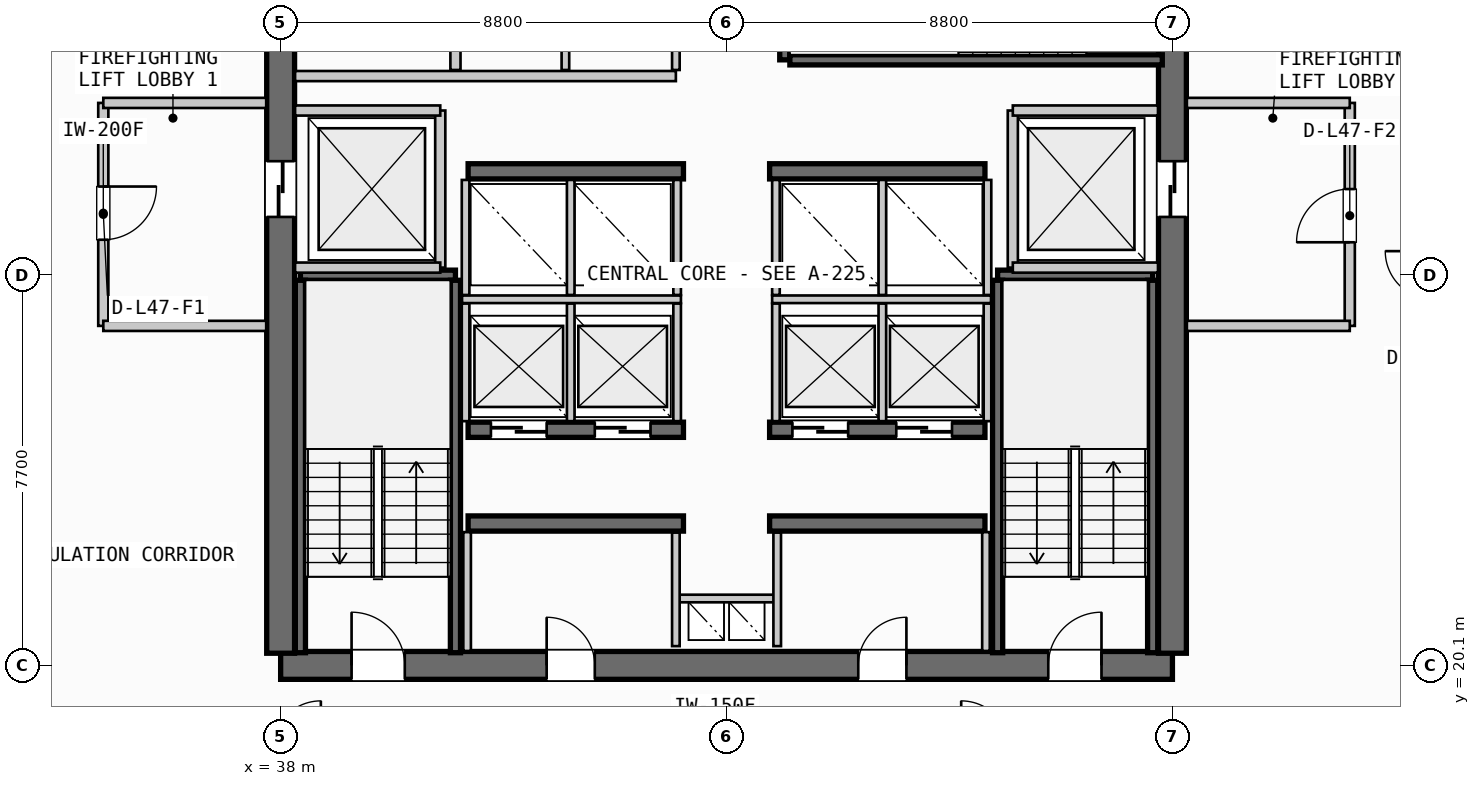
"""IFC4 building model, lengths in metres.
Left out: names, types, materials, properties, quantities, classifications, styles, units other than length and angle.
Written with IfcOpenShell. Run it as: python <this file> out.ifc"""

import sys

from ifc_helpers import new_model, si_unit, direction, frame, frame_2d, origin, place, context, subcontext, project, spatial, rectangle, extrude, source, transform, mapped, element, fill, save


model = new_model("IFC4")
c1 = context("Model", 3, precision=1e-05, world=origin(), true_north=direction((0.0, 1.0)))
c2 = subcontext(c1, "Body", "Model", "MODEL_VIEW")
j1 = project(units=[si_unit("LENGTHUNIT", "METRE"), si_unit("PLANEANGLEUNIT", "RADIAN")], contexts=[c1])
p1 = place(None, origin())
s1 = spatial("IfcSite", under=j1, at=p1, CompositionType="ELEMENT")
p2 = place(p1, origin())
s2 = spatial("IfcBuilding", under=s1, at=p2, CompositionType="ELEMENT")
p3 = place(p2, frame((0.0, 0.0, 183.4)))
s3 = spatial("IfcBuildingStorey", under=s2, at=p3, CompositionType="ELEMENT", Elevation=183.4)
p4 = place(p3, frame((38.0, 20.1, 0.0), z_axis=(0.0, 0.0, 1.0), x_axis=(1.0, 0.0, 0.0)))
e1 = element("IfcWall", 1, at=p4, inside=s3, PredefinedType="SHEAR", context=c2, shape_type="SweptSolid", body=[
    extrude(rectangle(XDim=17.6, YDim=0.55, at=frame_2d((8.8, 0.0))), origin(), (0.0, 0.0, 1.0), 3.26),
])
p5 = place(p4, frame((1.4, 0.0, 0.0)))
e2 = element("IfcOpeningElement", 2, at=p5, cuts=e1, PredefinedType="OPENING", context=c2, shape_type="SweptSolid", body=[
    extrude(rectangle(XDim=1.05, YDim=2.15, at=frame_2d((0.525, 1.075))), frame((0.0, 0.285, 0.0), z_axis=(0.0, -1.0, 0.0), x_axis=(1.0, 0.0, 0.0)), (0.0, 0.0, 1.0), 0.57),
])
p6 = place(p4, frame((15.15, 0.0, 0.0)))
e3 = element("IfcOpeningElement", 3, at=p6, cuts=e1, PredefinedType="OPENING", context=c2, shape_type="SweptSolid", body=[
    extrude(rectangle(XDim=1.05, YDim=2.15, at=frame_2d((0.525, 1.075))), frame((0.0, 0.285, 0.0), z_axis=(0.0, -1.0, 0.0), x_axis=(1.0, 0.0, 0.0)), (0.0, 0.0, 1.0), 0.57),
])
p7 = place(p4, frame((5.25, 0.0, 0.0)))
e4 = element("IfcOpeningElement", 4, at=p7, cuts=e1, PredefinedType="OPENING", context=c2, shape_type="SweptSolid", body=[
    extrude(rectangle(XDim=0.95, YDim=2.15, at=frame_2d((0.475, 1.075))), frame((0.0, 0.285, 0.0), z_axis=(0.0, -1.0, 0.0), x_axis=(1.0, 0.0, 0.0)), (0.0, 0.0, 1.0), 0.57),
])
p8 = place(p4, frame((11.4, 0.0, 0.0)))
e5 = element("IfcOpeningElement", 5, at=p8, cuts=e1, PredefinedType="OPENING", context=c2, shape_type="SweptSolid", body=[
    extrude(rectangle(XDim=0.95, YDim=2.15, at=frame_2d((0.475, 1.075))), frame((0.0, 0.285, 0.0), z_axis=(0.0, -1.0, 0.0), x_axis=(1.0, 0.0, 0.0)), (0.0, 0.0, 1.0), 0.57),
])
p9 = place(p3, frame((38.0, 35.26, 0.0), z_axis=(0.0, 0.0, 1.0), x_axis=(0.0, -1.0, 0.0)))
e6 = element("IfcWall", 6, at=p9, inside=s3, PredefinedType="SHEAR", context=c2, shape_type="SweptSolid", body=[
    extrude(rectangle(XDim=14.92, YDim=0.55, at=frame_2d((7.46, 0.0))), origin(), (0.0, 0.0, 1.0), 3.26),
])
p10 = place(p9, frame((5.21, 0.0, 0.0)))
e7 = element("IfcOpeningElement", 7, at=p10, cuts=e6, PredefinedType="OPENING", context=c2, shape_type="SweptSolid", body=[
    extrude(rectangle(XDim=1.1, YDim=2.2, at=frame_2d((0.55, 1.1))), frame((0.0, 0.285, 0.0), z_axis=(0.0, -1.0, 0.0), x_axis=(1.0, 0.0, 0.0)), (0.0, 0.0, 1.0), 0.57),
])
p11 = place(p3, frame((55.6, 20.34, 0.0), z_axis=(0.0, 0.0, 1.0), x_axis=(0.0, 1.0, 0.0)))
e8 = element("IfcWall", 8, at=p11, inside=s3, PredefinedType="SHEAR", context=c2, shape_type="SweptSolid", body=[
    extrude(rectangle(XDim=14.92, YDim=0.55, at=frame_2d((7.46, 0.0))), origin(), (0.0, 0.0, 1.0), 3.26),
])
p12 = place(p11, frame((12.71, 0.0, 0.0)))
e9 = element("IfcOpeningElement", 9, at=p12, cuts=e8, PredefinedType="OPENING", context=c2, shape_type="SweptSolid", body=[
    extrude(rectangle(XDim=1.05, YDim=2.15, at=frame_2d((0.525, 1.075))), frame((0.0, 0.285, 0.0), z_axis=(0.0, -1.0, 0.0), x_axis=(1.0, 0.0, 0.0)), (0.0, 0.0, 1.0), 0.57),
])
p13 = place(p11, frame((8.61, 0.0, 0.0)))
e10 = element("IfcOpeningElement", 10, at=p13, cuts=e8, PredefinedType="OPENING", context=c2, shape_type="SweptSolid", body=[
    extrude(rectangle(XDim=1.1, YDim=2.2, at=frame_2d((0.55, 1.1))), frame((0.0, 0.285, 0.0), z_axis=(0.0, -1.0, 0.0), x_axis=(1.0, 0.0, 0.0)), (0.0, 0.0, 1.0), 0.57),
])
for number, where, z_axis, x_axis in (
    (11, (41.7, 22.9, 0.0), (0.0, 0.0, 1.0), (1.0, 0.0, 0.0)),
    (12, (47.65, 22.9, 0.0), (0.0, 0.0, 1.0), (1.0, 0.0, 0.0)),
):
    element("IfcWall", number, at=place(p3, frame(where, z_axis=z_axis, x_axis=x_axis)), inside=s3, PredefinedType="SHEAR", context=c2, shape_type="SweptSolid", body=[
        extrude(rectangle(XDim=4.25, YDim=0.3, at=frame_2d((2.125, 0.0))), origin(), (0.0, 0.0, 1.0), 3.26),
    ])
p14 = place(p3, frame((41.7, 24.75, 0.0), z_axis=(0.0, 0.0, 1.0), x_axis=(1.0, 0.0, 0.0)))
e13 = element("IfcWall", 13, at=p14, inside=s3, PredefinedType="SHEAR", context=c2, shape_type="SweptSolid", body=[
    extrude(rectangle(XDim=4.25, YDim=0.3, at=frame_2d((2.125, 0.0))), origin(), (0.0, 0.0, 1.0), 3.26),
])
p15 = place(p14, frame((0.45, 0.0, 0.0)))
e14 = element("IfcOpeningElement", 14, at=p15, cuts=e13, PredefinedType="OPENING", context=c2, shape_type="SweptSolid", body=[
    extrude(rectangle(XDim=1.1, YDim=2.2, at=frame_2d((0.55, 1.1))), frame((0.0, 0.16, 0.0), z_axis=(0.0, -1.0, 0.0), x_axis=(1.0, 0.0, 0.0)), (0.0, 0.0, 1.0), 0.32),
])
p16 = place(p14, frame((2.5, 0.0, 0.0)))
e15 = element("IfcOpeningElement", 15, at=p16, cuts=e13, PredefinedType="OPENING", context=c2, shape_type="SweptSolid", body=[
    extrude(rectangle(XDim=1.1, YDim=2.2, at=frame_2d((0.55, 1.1))), frame((0.0, 0.16, 0.0), z_axis=(0.0, -1.0, 0.0), x_axis=(1.0, 0.0, 0.0)), (0.0, 0.0, 1.0), 0.32),
])
p17 = place(p3, frame((47.65, 24.75, 0.0), z_axis=(0.0, 0.0, 1.0), x_axis=(1.0, 0.0, 0.0)))
e16 = element("IfcWall", 16, at=p17, inside=s3, PredefinedType="SHEAR", context=c2, shape_type="SweptSolid", body=[
    extrude(rectangle(XDim=4.25, YDim=0.3, at=frame_2d((2.125, 0.0))), origin(), (0.0, 0.0, 1.0), 3.26),
])
p18 = place(p17, frame((0.45, 0.0, 0.0)))
e17 = element("IfcOpeningElement", 17, at=p18, cuts=e16, PredefinedType="OPENING", context=c2, shape_type="SweptSolid", body=[
    extrude(rectangle(XDim=1.1, YDim=2.2, at=frame_2d((0.55, 1.1))), frame((0.0, 0.16, 0.0), z_axis=(0.0, -1.0, 0.0), x_axis=(1.0, 0.0, 0.0)), (0.0, 0.0, 1.0), 0.32),
])
p19 = place(p17, frame((2.5, 0.0, 0.0)))
e18 = element("IfcOpeningElement", 18, at=p19, cuts=e16, PredefinedType="OPENING", context=c2, shape_type="SweptSolid", body=[
    extrude(rectangle(XDim=1.1, YDim=2.2, at=frame_2d((0.55, 1.1))), frame((0.0, 0.16, 0.0), z_axis=(0.0, -1.0, 0.0), x_axis=(1.0, 0.0, 0.0)), (0.0, 0.0, 1.0), 0.32),
])
for number, where, z_axis, x_axis in (
    (19, (41.7, 29.85, 0.0), (0.0, 0.0, 1.0), (1.0, 0.0, 0.0)),
    (20, (47.65, 29.85, 0.0), (0.0, 0.0, 1.0), (1.0, 0.0, 0.0)),
):
    element("IfcWall", number, at=place(p3, frame(where, z_axis=z_axis, x_axis=x_axis)), inside=s3, PredefinedType="SHEAR", context=c2, shape_type="SweptSolid", body=[
        extrude(rectangle(XDim=4.25, YDim=0.3, at=frame_2d((2.125, 0.0))), origin(), (0.0, 0.0, 1.0), 3.26),
    ])
p20 = place(p3, frame((38.39, 27.8, 0.0), z_axis=(0.0, 0.0, 1.0), x_axis=(1.0, 0.0, 0.0)))
e21 = element("IfcWall", 21, at=p20, inside=s3, PredefinedType="SHEAR", context=c2, shape_type="SweptSolid", body=[
    extrude(rectangle(XDim=3.06, YDim=0.2, at=frame_2d((1.53, 0.0))), origin(), (0.0, 0.0, 1.0), 3.26),
])
for number, where, z_axis, x_axis in (
    (22, (41.45, 27.7, 0.0), (0.0, 0.0, 1.0), (0.0, -1.0, 0.0)),
    (23, (38.39, 20.35, 0.0), (0.0, 0.0, 1.0), (0.0, 1.0, 0.0)),
):
    element("IfcWall", number, at=place(p3, frame(where, z_axis=z_axis, x_axis=x_axis)), inside=s3, PredefinedType="SHEAR", context=c2, shape_type="SweptSolid", body=[
        extrude(rectangle(XDim=7.35, YDim=0.2, at=frame_2d((3.675, 0.0))), origin(), (0.0, 0.0, 1.0), 3.26),
    ])
p21 = place(p3, frame((52.15, 27.8, 0.0), z_axis=(0.0, 0.0, 1.0), x_axis=(1.0, 0.0, 0.0)))
e24 = element("IfcWall", 24, at=p21, inside=s3, PredefinedType="SHEAR", context=c2, shape_type="SweptSolid", body=[
    extrude(rectangle(XDim=3.06, YDim=0.2, at=frame_2d((1.53, 0.0))), origin(), (0.0, 0.0, 1.0), 3.26),
])
for number, where, z_axis, x_axis in (
    (25, (55.21, 27.7, 0.0), (0.0, 0.0, 1.0), (0.0, -1.0, 0.0)),
    (26, (52.15, 20.35, 0.0), (0.0, 0.0, 1.0), (0.0, 1.0, 0.0)),
):
    element("IfcWall", number, at=place(p3, frame(where, z_axis=z_axis, x_axis=x_axis)), inside=s3, PredefinedType="SHEAR", context=c2, shape_type="SweptSolid", body=[
        extrude(rectangle(XDim=7.35, YDim=0.2, at=frame_2d((3.675, 0.0))), origin(), (0.0, 0.0, 1.0), 3.26),
    ])
p22 = place(p3, frame((47.95, 32.05, 0.0), z_axis=(0.0, 0.0, 1.0), x_axis=(0.0, 1.0, 0.0)))
e27 = element("IfcWall", 27, at=p22, inside=s3, PredefinedType="SHEAR", context=c2, shape_type="SweptSolid", body=[
    extrude(rectangle(XDim=3.06, YDim=0.2, at=frame_2d((1.53, 0.0))), origin(), (0.0, 0.0, 1.0), 3.26),
])
p23 = place(p3, frame((55.4, 32.05, 0.0), z_axis=(0.0, 0.0, 1.0), x_axis=(-1.0, 0.0, 0.0)))
e28 = element("IfcWall", 28, at=p23, inside=s3, PredefinedType="SHEAR", context=c2, shape_type="SweptSolid", body=[
    extrude(rectangle(XDim=7.35, YDim=0.2, at=frame_2d((3.675, 0.0))), origin(), (0.0, 0.0, 1.0), 3.26),
])
p24 = place(p3, frame((45.8, 21.42, 0.0), z_axis=(0.0, 0.0, 1.0), x_axis=(1.0, 0.0, 0.0)))
e29 = element("IfcWall", 29, at=p24, inside=s3, PredefinedType="PARTITIONING", context=c2, shape_type="SweptSolid", body=[
    extrude(rectangle(XDim=2.0, YDim=0.15, at=frame_2d((1.0, 0.0))), origin(), (0.0, 0.0, 1.0), 2.28),
])
for number, where, z_axis, x_axis in (
    (30, (45.8, 20.48, 0.0), (0.0, 0.0, 1.0), (0.0, 1.0, 0.0)),
    (31, (47.8, 20.48, 0.0), (0.0, 0.0, 1.0), (0.0, 1.0, 0.0)),
):
    element("IfcWall", number, at=place(p3, frame(where, z_axis=z_axis, x_axis=x_axis)), inside=s3, PredefinedType="PARTITIONING", context=c2, shape_type="SweptSolid", body=[
        extrude(rectangle(XDim=2.24, YDim=0.15, at=frame_2d((1.12, 0.0))), origin(), (0.0, 0.0, 1.0), 2.28),
    ])
p25 = place(p3, frame((41.15, 27.95, 0.0), z_axis=(0.0, 0.0, 1.0), x_axis=(0.0, 1.0, 0.0)))
e32 = element("IfcWall", 32, at=p25, inside=s3, PredefinedType="PARTITIONING", context=c2, shape_type="SweptSolid", body=[
    extrude(rectangle(XDim=3.1, YDim=0.2, at=frame_2d((1.55, 0.0))), origin(), (0.0, 0.0, 1.0), 2.28),
])
for number, where, z_axis, x_axis in (
    (33, (38.285, 27.95, 0.0), (0.0, 0.0, 1.0), (1.0, 0.0, 0.0)),
    (34, (38.285, 31.05, 0.0), (0.0, 0.0, 1.0), (1.0, 0.0, 0.0)),
):
    element("IfcWall", number, at=place(p3, frame(where, z_axis=z_axis, x_axis=x_axis)), inside=s3, PredefinedType="PARTITIONING", context=c2, shape_type="SweptSolid", body=[
        extrude(rectangle(XDim=2.865, YDim=0.2, at=frame_2d((1.433, 0.0))), origin(), (0.0, 0.0, 1.0), 2.28),
    ])
p26 = place(p3, frame((34.5, 31.2, 0.0), z_axis=(0.0, 0.0, 1.0), x_axis=(0.0, -1.0, 0.0)))
e35 = element("IfcWall", 35, at=p26, inside=s3, PredefinedType="PARTITIONING", context=c2, shape_type="SweptSolid", body=[
    extrude(rectangle(XDim=4.4, YDim=0.2, at=frame_2d((2.2, 0.0))), origin(), (0.0, 0.0, 1.0), 2.28),
])
p27 = place(p26, frame((1.65, 0.0, 0.0)))
e36 = element("IfcOpeningElement", 36, at=p27, cuts=e35, PredefinedType="OPENING", context=c2, shape_type="SweptSolid", body=[
    extrude(rectangle(XDim=1.05, YDim=2.15, at=frame_2d((0.525, 1.075))), frame((0.0, 0.11, 0.0), z_axis=(0.0, -1.0, 0.0), x_axis=(1.0, 0.0, 0.0)), (0.0, 0.0, 1.0), 0.22),
])
for number, where, z_axis, x_axis in (
    (37, (34.5, 26.8, 0.0), (0.0, 0.0, 1.0), (1.0, 0.0, 0.0)),
    (38, (34.5, 31.2, 0.0), (0.0, 0.0, 1.0), (1.0, 0.0, 0.0)),
):
    element("IfcWall", number, at=place(p3, frame(where, z_axis=z_axis, x_axis=x_axis)), inside=s3, PredefinedType="PARTITIONING", context=c2, shape_type="SweptSolid", body=[
        extrude(rectangle(XDim=3.215, YDim=0.2, at=frame_2d((1.607, 0.0))), origin(), (0.0, 0.0, 1.0), 2.28),
    ])
p28 = place(p3, frame((52.45, 27.95, 0.0), z_axis=(0.0, 0.0, 1.0), x_axis=(0.0, 1.0, 0.0)))
e39 = element("IfcWall", 39, at=p28, inside=s3, PredefinedType="PARTITIONING", context=c2, shape_type="SweptSolid", body=[
    extrude(rectangle(XDim=3.1, YDim=0.2, at=frame_2d((1.55, 0.0))), origin(), (0.0, 0.0, 1.0), 2.28),
])
for number, where, z_axis, x_axis in (
    (40, (52.45, 27.95, 0.0), (0.0, 0.0, 1.0), (1.0, 0.0, 0.0)),
    (41, (52.45, 31.05, 0.0), (0.0, 0.0, 1.0), (1.0, 0.0, 0.0)),
):
    element("IfcWall", number, at=place(p3, frame(where, z_axis=z_axis, x_axis=x_axis)), inside=s3, PredefinedType="PARTITIONING", context=c2, shape_type="SweptSolid", body=[
        extrude(rectangle(XDim=2.865, YDim=0.2, at=frame_2d((1.433, 0.0))), origin(), (0.0, 0.0, 1.0), 2.28),
    ])
p29 = place(p3, frame((59.1, 26.8, 0.0), z_axis=(0.0, 0.0, 1.0), x_axis=(0.0, 1.0, 0.0)))
e42 = element("IfcWall", 42, at=p29, inside=s3, PredefinedType="PARTITIONING", context=c2, shape_type="SweptSolid", body=[
    extrude(rectangle(XDim=4.4, YDim=0.2, at=frame_2d((2.2, 0.0))), origin(), (0.0, 0.0, 1.0), 2.28),
])
p30 = place(p29, frame((1.65, 0.0, 0.0)))
e43 = element("IfcOpeningElement", 43, at=p30, cuts=e42, PredefinedType="OPENING", context=c2, shape_type="SweptSolid", body=[
    extrude(rectangle(XDim=1.05, YDim=2.15, at=frame_2d((0.525, 1.075))), frame((0.0, 0.11, 0.0), z_axis=(0.0, -1.0, 0.0), x_axis=(1.0, 0.0, 0.0)), (0.0, 0.0, 1.0), 0.22),
])
for number, where, z_axis, x_axis in (
    (44, (55.885, 26.8, 0.0), (0.0, 0.0, 1.0), (1.0, 0.0, 0.0)),
    (45, (55.885, 31.2, 0.0), (0.0, 0.0, 1.0), (1.0, 0.0, 0.0)),
):
    element("IfcWall", number, at=place(p3, frame(where, z_axis=z_axis, x_axis=x_axis)), inside=s3, PredefinedType="PARTITIONING", context=c2, shape_type="SweptSolid", body=[
        extrude(rectangle(XDim=3.215, YDim=0.2, at=frame_2d((1.607, 0.0))), origin(), (0.0, 0.0, 1.0), 2.28),
    ])
for number, where, z_axis, x_axis in (
    (46, (41.68, 20.385, 0.0), (0.0, 0.0, 1.0), (0.0, 1.0, 0.0)),
    (47, (51.92, 20.385, 0.0), (0.0, 0.0, 1.0), (0.0, 1.0, 0.0)),
):
    element("IfcWall", number, at=place(p3, frame(where, z_axis=z_axis, x_axis=x_axis)), inside=s3, PredefinedType="PARTITIONING", context=c2, shape_type="SweptSolid", body=[
        extrude(rectangle(XDim=2.345, YDim=0.15, at=frame_2d((1.172, 0.0))), origin(), (0.0, 0.0, 1.0), 2.28),
    ])
p31 = place(p3, frame((41.58, 27.325, 0.0), z_axis=(0.0, 0.0, 1.0), x_axis=(1.0, 0.0, 0.0)))
e48 = element("IfcWall", 48, at=p31, inside=s3, PredefinedType="PARTITIONING", context=c2, shape_type="SweptSolid", body=[
    extrude(rectangle(XDim=4.32, YDim=0.15, at=frame_2d((2.16, 0.0))), origin(), (0.0, 0.0, 1.0), 2.28),
])
p32 = place(p3, frame((47.7, 27.325, 0.0), z_axis=(0.0, 0.0, 1.0), x_axis=(1.0, 0.0, 0.0)))
e49 = element("IfcWall", 49, at=p32, inside=s3, PredefinedType="PARTITIONING", context=c2, shape_type="SweptSolid", body=[
    extrude(rectangle(XDim=4.32, YDim=0.15, at=frame_2d((2.16, 0.0))), origin(), (0.0, 0.0, 1.0), 2.28),
])
for number, where, z_axis, x_axis in (
    (50, (41.65, 24.92, 0.0), (0.0, 0.0, 1.0), (0.0, 1.0, 0.0)),
    (51, (43.725, 24.92, 0.0), (0.0, 0.0, 1.0), (0.0, 1.0, 0.0)),
    (52, (45.825, 24.92, 0.0), (0.0, 0.0, 1.0), (0.0, 1.0, 0.0)),
    (53, (47.775, 24.92, 0.0), (0.0, 0.0, 1.0), (0.0, 1.0, 0.0)),
    (54, (49.875, 24.92, 0.0), (0.0, 0.0, 1.0), (0.0, 1.0, 0.0)),
    (55, (51.95, 24.92, 0.0), (0.0, 0.0, 1.0), (0.0, 1.0, 0.0)),
):
    element("IfcWall", number, at=place(p3, frame(where, z_axis=z_axis, x_axis=x_axis)), inside=s3, PredefinedType="PARTITIONING", context=c2, shape_type="SweptSolid", body=[
        extrude(rectangle(XDim=2.32, YDim=0.15, at=frame_2d((1.16, 0.0))), origin(), (0.0, 0.0, 1.0), 2.28),
    ])
for number, where, z_axis, x_axis in (
    (56, (41.65, 27.41, 0.0), (0.0, 0.0, 1.0), (0.0, 1.0, 0.0)),
    (57, (43.725, 27.41, 0.0), (0.0, 0.0, 1.0), (0.0, 1.0, 0.0)),
    (58, (45.825, 27.41, 0.0), (0.0, 0.0, 1.0), (0.0, 1.0, 0.0)),
    (59, (47.775, 27.41, 0.0), (0.0, 0.0, 1.0), (0.0, 1.0, 0.0)),
    (60, (49.875, 27.41, 0.0), (0.0, 0.0, 1.0), (0.0, 1.0, 0.0)),
    (61, (51.95, 27.41, 0.0), (0.0, 0.0, 1.0), (0.0, 1.0, 0.0)),
):
    element("IfcWall", number, at=place(p3, frame(where, z_axis=z_axis, x_axis=x_axis)), inside=s3, PredefinedType="PARTITIONING", context=c2, shape_type="SweptSolid", body=[
        extrude(rectangle(XDim=2.27, YDim=0.15, at=frame_2d((1.135, 0.0))), origin(), (0.0, 0.0, 1.0), 2.28),
    ])
p33 = place(p3, frame((41.45, 31.85, 0.0), z_axis=(0.0, 0.0, 1.0), x_axis=(0.0, 1.0, 0.0)))
e62 = element("IfcWall", 62, at=p33, inside=s3, PredefinedType="PARTITIONING", context=c2, shape_type="SweptSolid", body=[
    extrude(rectangle(XDim=3.365, YDim=0.2, at=frame_2d((1.683, 0.0))), origin(), (0.0, 0.0, 1.0), 2.28),
])
p34 = place(p3, frame((38.285, 31.73, 0.0), z_axis=(0.0, 0.0, 1.0), x_axis=(1.0, 0.0, 0.0)))
e63 = element("IfcWall", 63, at=p34, inside=s3, PredefinedType="PARTITIONING", context=c2, shape_type="SweptSolid", body=[
    extrude(rectangle(XDim=7.515, YDim=0.2, at=frame_2d((3.758, 0.0))), origin(), (0.0, 0.0, 1.0), 2.28),
])
p35 = place(p3, frame((45.8, 31.85, 0.0), z_axis=(0.0, 0.0, 1.0), x_axis=(0.0, 1.0, 0.0)))
e64 = element("IfcWall", 64, at=p35, inside=s3, PredefinedType="PARTITIONING", context=c2, shape_type="SweptSolid", body=[
    extrude(rectangle(XDim=3.365, YDim=0.15, at=frame_2d((1.683, 0.0))), origin(), (0.0, 0.0, 1.0), 2.28),
])
p36 = place(p3, frame((43.62, 31.85, 0.0), z_axis=(0.0, 0.0, 1.0), x_axis=(0.0, 1.0, 0.0)))
e65 = element("IfcWall", 65, at=p36, inside=s3, PredefinedType="PLUMBINGWALL", context=c2, shape_type="SweptSolid", body=[
    extrude(rectangle(XDim=3.365, YDim=0.15, at=frame_2d((1.683, 0.0))), origin(), (0.0, 0.0, 1.0), 2.28),
])
m1 = source(origin(), c2, "Body", "SweptSolid", [
    extrude(rectangle(XDim=1.05, YDim=2.15, at=frame_2d((0.525, 1.075))), frame((0.0, 0.025, 0.0), z_axis=(0.0, -1.0, 0.0), x_axis=(1.0, 0.0, 0.0)), (0.0, 0.0, 1.0), 0.05),
])
p37 = place(p5, origin())
e66 = element("IfcDoor", 66, at=p37, inside=s3, OperationType="SINGLE_SWING_LEFT", PredefinedType="DOOR", context=c2, shape_type="MappedRepresentation", body=[
    mapped(m1, transform((0.0, 0.0, 0.0), scale=1.0)),
])
fill(e2, e66)
p38 = place(p6, origin())
e67 = element("IfcDoor", 67, at=p38, inside=s3, OperationType="SINGLE_SWING_RIGHT", PredefinedType="DOOR", context=c2, shape_type="MappedRepresentation", body=[
    mapped(m1, transform((0.0, 0.0, 0.0), scale=1.0)),
])
fill(e3, e67)
m2 = source(origin(), c2, "Body", "SweptSolid", [
    extrude(rectangle(XDim=1.1, YDim=2.2, at=frame_2d((0.55, 1.1))), frame((0.0, 0.025, 0.0), z_axis=(0.0, -1.0, 0.0), x_axis=(1.0, 0.0, 0.0)), (0.0, 0.0, 1.0), 0.05),
])
p39 = place(p10, origin())
e68 = element("IfcDoor", 68, at=p39, inside=s3, OperationType="SLIDING_TO_LEFT", PredefinedType="DOOR", context=c2, shape_type="MappedRepresentation", body=[
    mapped(m2, transform((0.0, 0.0, 0.0), scale=1.0)),
])
fill(e7, e68)
p40 = place(p13, origin())
e69 = element("IfcDoor", 69, at=p40, inside=s3, OperationType="SLIDING_TO_RIGHT", PredefinedType="DOOR", context=c2, shape_type="MappedRepresentation", body=[
    mapped(m2, transform((0.0, 0.0, 0.0), scale=1.0)),
])
fill(e10, e69)
m3 = source(origin(), c2, "Body", "SweptSolid", [
    extrude(rectangle(XDim=0.95, YDim=2.15, at=frame_2d((0.475, 1.075))), frame((0.0, 0.025, 0.0), z_axis=(0.0, -1.0, 0.0), x_axis=(1.0, 0.0, 0.0)), (0.0, 0.0, 1.0), 0.05),
])
p41 = place(p7, origin())
e70 = element("IfcDoor", 70, at=p41, inside=s3, OperationType="SINGLE_SWING_LEFT", PredefinedType="DOOR", context=c2, shape_type="MappedRepresentation", body=[
    mapped(m3, transform((0.0, 0.0, 0.0), scale=1.0)),
])
fill(e4, e70)
p42 = place(p8, origin())
e71 = element("IfcDoor", 71, at=p42, inside=s3, OperationType="SINGLE_SWING_RIGHT", PredefinedType="DOOR", context=c2, shape_type="MappedRepresentation", body=[
    mapped(m3, transform((0.0, 0.0, 0.0), scale=1.0)),
])
fill(e5, e71)
p43 = place(p15, origin())
e72 = element("IfcDoor", 72, at=p43, inside=s3, OperationType="SLIDING_TO_RIGHT", PredefinedType="DOOR", context=c2, shape_type="MappedRepresentation", body=[
    mapped(m2, transform((0.0, 0.0, 0.0), scale=1.0)),
])
fill(e14, e72)
p44 = place(p16, origin())
e73 = element("IfcDoor", 73, at=p44, inside=s3, OperationType="SLIDING_TO_RIGHT", PredefinedType="DOOR", context=c2, shape_type="MappedRepresentation", body=[
    mapped(m2, transform((0.0, 0.0, 0.0), scale=1.0)),
])
fill(e15, e73)
p45 = place(p18, origin())
e74 = element("IfcDoor", 74, at=p45, inside=s3, OperationType="SLIDING_TO_RIGHT", PredefinedType="DOOR", context=c2, shape_type="MappedRepresentation", body=[
    mapped(m2, transform((0.0, 0.0, 0.0), scale=1.0)),
])
fill(e17, e74)
p46 = place(p19, origin())
e75 = element("IfcDoor", 75, at=p46, inside=s3, OperationType="SLIDING_TO_RIGHT", PredefinedType="DOOR", context=c2, shape_type="MappedRepresentation", body=[
    mapped(m2, transform((0.0, 0.0, 0.0), scale=1.0)),
])
fill(e18, e75)
p47 = place(p27, origin())
e76 = element("IfcDoor", 76, at=p47, inside=s3, OperationType="SINGLE_SWING_LEFT", PredefinedType="DOOR", context=c2, shape_type="MappedRepresentation", body=[
    mapped(m1, transform((0.0, 0.0, 0.0), scale=1.0)),
])
fill(e36, e76)
p48 = place(p30, origin())
e77 = element("IfcDoor", 77, at=p48, inside=s3, OperationType="SINGLE_SWING_LEFT", PredefinedType="DOOR", context=c2, shape_type="MappedRepresentation", body=[
    mapped(m1, transform((0.0, 0.0, 0.0), scale=1.0)),
])
fill(e43, e77)
save(model, sys.argv[1])
